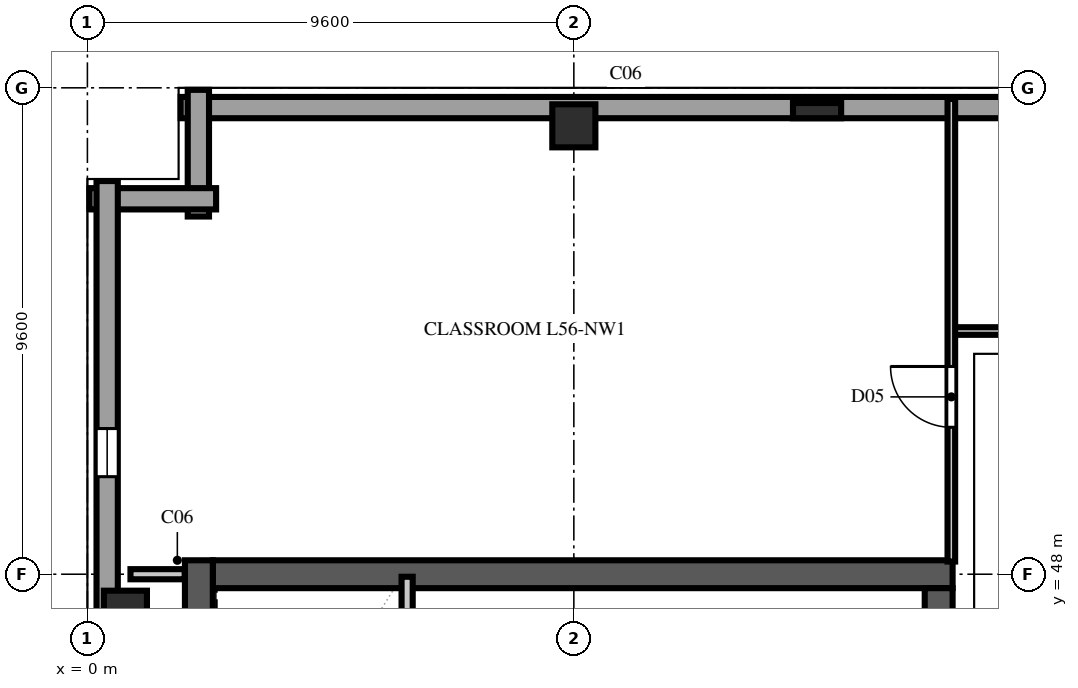
"""IFC4 building model, lengths in metres.
Left out: names, types, materials, properties, quantities, classifications, styles, units other than length and angle.
Written with IfcOpenShell. Run it as: python <this file> out.ifc"""

import sys

from ifc_helpers import new_model, si_unit, direction, frame, frame_2d, origin, origin_2d, place, context, subcontext, project, spatial, rectangle, extrude, element, fill, save


model = new_model("IFC4")
c1 = context("Model", 3, precision=1e-05, world=origin(), true_north=direction((0.0, 1.0)))
c2 = subcontext(c1, "Body", "Model", "MODEL_VIEW")
j1 = project(units=[si_unit("LENGTHUNIT", "METRE"), si_unit("PLANEANGLEUNIT", "RADIAN")], contexts=[c1])
p1 = place(None, origin())
s1 = spatial("IfcSite", under=j1, at=p1, CompositionType="ELEMENT")
p2 = place(p1, origin())
s2 = spatial("IfcBuilding", under=s1, at=p2, CompositionType="ELEMENT")
p3 = place(p2, frame((0.0, 0.0, 221.8)))
s3 = spatial("IfcBuildingStorey", under=s2, at=p3, CompositionType="ELEMENT", Elevation=221.8)
p4 = place(p3, frame((2.475, 48.0, 0.0), z_axis=(0.0, 0.0, 1.0), x_axis=(1.0, 0.0, 0.0)))
e1 = element("IfcWall", 1, at=p4, inside=s3, PredefinedType="SHEAR", context=c2, shape_type="SweptSolid", body=[
    extrude(rectangle(XDim=14.6, YDim=0.55, at=frame_2d((7.3, 0.0))), origin(), (0.0, 0.0, 1.0), 3.54),
])
p5 = place(p3, frame((2.2, 9.325, 0.0), z_axis=(0.0, 0.0, 1.0), x_axis=(0.0, 1.0, 0.0)))
e2 = element("IfcWall", 2, at=p5, inside=s3, PredefinedType="SHEAR", context=c2, shape_type="SweptSolid", body=[
    extrude(rectangle(XDim=38.95, YDim=0.55, at=frame_2d((19.475, 0.0))), origin(), (0.0, 0.0, 1.0), 3.54),
])
p6 = place(p3, frame((16.8, 36.4, 0.0), z_axis=(0.0, 0.0, 1.0), x_axis=(0.0, 1.0, 0.0)))
e3 = element("IfcWall", 3, at=p6, inside=s3, PredefinedType="SHEAR", context=c2, shape_type="SweptSolid", body=[
    extrude(rectangle(XDim=11.325, YDim=0.55, at=frame_2d((5.663, 0.0))), origin(), (0.0, 0.0, 1.0), 3.54),
])
p7 = place(p6, frame((9.2, 0.0, 0.0)))
e4 = element("IfcOpeningElement", 4, at=p7, cuts=e3, PredefinedType="OPENING", context=c2, shape_type="SweptSolid", body=[
    extrude(rectangle(XDim=0.95, YDim=2.15, at=frame_2d((0.475, 1.075))), frame((0.0, 0.287, 0.0), z_axis=(0.0, -1.0, 0.0), x_axis=(1.0, 0.0, 0.0)), (0.0, 0.0, 1.0), 0.574),
])
for number, where, z_axis, x_axis in (
    (5, (0.75, 47.25, 0.0), (0.0, 0.0, 1.0), (1.0, 0.0, 0.0)),
    (6, (9.6, 56.85, 0.0), (0.0, 0.0, 1.0), (1.0, 0.0, 0.0)),
):
    element("IfcColumn", number, at=place(p3, frame(where, z_axis=z_axis, x_axis=x_axis)), inside=s3, PredefinedType="COLUMN", context=c2, shape_type="SweptSolid", body=[
        extrude(rectangle(XDim=0.85, YDim=0.85, at=origin_2d()), origin(), (0.0, 0.0, 1.0), 3.8),
    ])
p8 = place(p3, frame((14.4, 57.15, 0.0), z_axis=(0.0, 0.0, 1.0), x_axis=(1.0, 0.0, 0.0)))
e7 = element("IfcColumn", 7, at=p8, inside=s3, PredefinedType="PILASTER", context=c2, shape_type="SweptSolid", body=[
    extrude(rectangle(XDim=0.95, YDim=0.3, at=origin_2d()), origin(), (0.0, 0.0, 1.0), 3.8),
])
p9 = place(p3, frame((36.56, 57.21, 0.0), z_axis=(0.0, 0.0, 1.0), x_axis=(-1.0, 0.0, 0.0)))
e8 = element("IfcWall", 8, at=p9, inside=s3, PredefinedType="SOLIDWALL", context=c2, shape_type="SweptSolid", body=[
    extrude(rectangle(XDim=34.72, YDim=0.42, at=frame_2d((17.36, 0.0))), origin(), (0.0, 0.0, 1.0), 3.54),
])
p10 = place(p9, frame((4.885, 0.0, 0.9)))
e9 = element("IfcOpeningElement", 9, at=p10, cuts=e8, PredefinedType="OPENING", context=c2, shape_type="SweptSolid", body=[
    extrude(rectangle(XDim=0.95, YDim=1.85, at=frame_2d((0.475, 0.925))), frame((0.0, 0.222, 0.0), z_axis=(0.0, -1.0, 0.0), x_axis=(1.0, 0.0, 0.0)), (0.0, 0.0, 1.0), 0.444),
])
p11 = place(p9, frame((9.41, 0.0, 0.9)))
e10 = element("IfcOpeningElement", 10, at=p11, cuts=e8, PredefinedType="OPENING", context=c2, shape_type="SweptSolid", body=[
    extrude(rectangle(XDim=1.5, YDim=1.85, at=frame_2d((0.75, 0.925))), frame((0.0, 0.222, 0.0), z_axis=(0.0, -1.0, 0.0), x_axis=(1.0, 0.0, 0.0)), (0.0, 0.0, 1.0), 0.444),
])
p12 = place(p9, frame((14.485, 0.0, 0.9)))
e11 = element("IfcOpeningElement", 11, at=p12, cuts=e8, PredefinedType="OPENING", context=c2, shape_type="SweptSolid", body=[
    extrude(rectangle(XDim=0.95, YDim=1.85, at=frame_2d((0.475, 0.925))), frame((0.0, 0.222, 0.0), z_axis=(0.0, -1.0, 0.0), x_axis=(1.0, 0.0, 0.0)), (0.0, 0.0, 1.0), 0.444),
])
for number, where, z_axis, x_axis in (
    (12, (2.19, 57.56, 0.0), (0.0, 0.0, 1.0), (0.0, -1.0, 0.0)),
    (13, (2.54, 55.41, 0.0), (0.0, 0.0, 1.0), (-1.0, 0.0, 0.0)),
):
    element("IfcWall", number, at=place(p3, frame(where, z_axis=z_axis, x_axis=x_axis)), inside=s3, PredefinedType="SOLIDWALL", context=c2, shape_type="SweptSolid", body=[
        extrude(rectangle(XDim=2.5, YDim=0.42, at=frame_2d((1.25, 0.0))), origin(), (0.0, 0.0, 1.0), 3.54),
    ])
p13 = place(p3, frame((0.39, 55.76, 0.0), z_axis=(0.0, 0.0, 1.0), x_axis=(0.0, -1.0, 0.0)))
e14 = element("IfcWall", 14, at=p13, inside=s3, PredefinedType="SOLIDWALL", context=c2, shape_type="SweptSolid", body=[
    extrude(rectangle(XDim=53.92, YDim=0.42, at=frame_2d((26.96, 0.0))), origin(), (0.0, 0.0, 1.0), 3.54),
])
p14 = place(p13, frame((4.885, 0.0, 0.9)))
e15 = element("IfcOpeningElement", 15, at=p14, cuts=e14, PredefinedType="OPENING", context=c2, shape_type="SweptSolid", body=[
    extrude(rectangle(XDim=0.95, YDim=1.85, at=frame_2d((0.475, 0.925))), frame((0.0, 0.222, 0.0), z_axis=(0.0, -1.0, 0.0), x_axis=(1.0, 0.0, 0.0)), (0.0, 0.0, 1.0), 0.444),
])
p15 = place(p13, frame((9.41, 0.0, 0.9)))
e16 = element("IfcOpeningElement", 16, at=p15, cuts=e14, PredefinedType="OPENING", context=c2, shape_type="SweptSolid", body=[
    extrude(rectangle(XDim=1.5, YDim=1.85, at=frame_2d((0.75, 0.925))), frame((0.0, 0.222, 0.0), z_axis=(0.0, -1.0, 0.0), x_axis=(1.0, 0.0, 0.0)), (0.0, 0.0, 1.0), 0.444),
])
p16 = place(p13, frame((14.485, 0.0, 0.9)))
e17 = element("IfcOpeningElement", 17, at=p16, cuts=e14, PredefinedType="OPENING", context=c2, shape_type="SweptSolid", body=[
    extrude(rectangle(XDim=0.95, YDim=1.85, at=frame_2d((0.475, 0.925))), frame((0.0, 0.222, 0.0), z_axis=(0.0, -1.0, 0.0), x_axis=(1.0, 0.0, 0.0)), (0.0, 0.0, 1.0), 0.444),
])
p17 = place(p13, frame((19.01, 0.0, 0.9)))
e18 = element("IfcOpeningElement", 18, at=p17, cuts=e14, PredefinedType="OPENING", context=c2, shape_type="SweptSolid", body=[
    extrude(rectangle(XDim=1.5, YDim=1.85, at=frame_2d((0.75, 0.925))), frame((0.0, 0.222, 0.0), z_axis=(0.0, -1.0, 0.0), x_axis=(1.0, 0.0, 0.0)), (0.0, 0.0, 1.0), 0.444),
])
p18 = place(p13, frame((24.085, 0.0, 0.9)))
e19 = element("IfcOpeningElement", 19, at=p18, cuts=e14, PredefinedType="OPENING", context=c2, shape_type="SweptSolid", body=[
    extrude(rectangle(XDim=0.95, YDim=1.85, at=frame_2d((0.475, 0.925))), frame((0.0, 0.222, 0.0), z_axis=(0.0, -1.0, 0.0), x_axis=(1.0, 0.0, 0.0)), (0.0, 0.0, 1.0), 0.444),
])
p19 = place(p13, frame((28.61, 0.0, 0.9)))
e20 = element("IfcOpeningElement", 20, at=p19, cuts=e14, PredefinedType="OPENING", context=c2, shape_type="SweptSolid", body=[
    extrude(rectangle(XDim=1.5, YDim=1.85, at=frame_2d((0.75, 0.925))), frame((0.0, 0.222, 0.0), z_axis=(0.0, -1.0, 0.0), x_axis=(1.0, 0.0, 0.0)), (0.0, 0.0, 1.0), 0.444),
])
p20 = place(p13, frame((33.685, 0.0, 0.9)))
e21 = element("IfcOpeningElement", 21, at=p20, cuts=e14, PredefinedType="OPENING", context=c2, shape_type="SweptSolid", body=[
    extrude(rectangle(XDim=0.95, YDim=1.85, at=frame_2d((0.475, 0.925))), frame((0.0, 0.222, 0.0), z_axis=(0.0, -1.0, 0.0), x_axis=(1.0, 0.0, 0.0)), (0.0, 0.0, 1.0), 0.444),
])
p21 = place(p13, frame((38.21, 0.0, 0.9)))
e22 = element("IfcOpeningElement", 22, at=p21, cuts=e14, PredefinedType="OPENING", context=c2, shape_type="SweptSolid", body=[
    extrude(rectangle(XDim=1.5, YDim=1.85, at=frame_2d((0.75, 0.925))), frame((0.0, 0.222, 0.0), z_axis=(0.0, -1.0, 0.0), x_axis=(1.0, 0.0, 0.0)), (0.0, 0.0, 1.0), 0.444),
])
p22 = place(p13, frame((43.285, 0.0, 0.9)))
e23 = element("IfcOpeningElement", 23, at=p22, cuts=e14, PredefinedType="OPENING", context=c2, shape_type="SweptSolid", body=[
    extrude(rectangle(XDim=0.95, YDim=1.85, at=frame_2d((0.475, 0.925))), frame((0.0, 0.222, 0.0), z_axis=(0.0, -1.0, 0.0), x_axis=(1.0, 0.0, 0.0)), (0.0, 0.0, 1.0), 0.444),
])
p23 = place(p13, frame((47.81, 0.0, 0.9)))
e24 = element("IfcOpeningElement", 24, at=p23, cuts=e14, PredefinedType="OPENING", context=c2, shape_type="SweptSolid", body=[
    extrude(rectangle(XDim=1.5, YDim=1.85, at=frame_2d((0.75, 0.925))), frame((0.0, 0.222, 0.0), z_axis=(0.0, -1.0, 0.0), x_axis=(1.0, 0.0, 0.0)), (0.0, 0.0, 1.0), 0.444),
])
p24 = place(p3, frame((6.31, 40.14, 0.0), z_axis=(0.0, 0.0, 1.0), x_axis=(0.0, 1.0, 0.0)))
e25 = element("IfcWall", 25, at=p24, inside=s3, PredefinedType="SOLIDWALL", context=c2, shape_type="SweptSolid", body=[
    extrude(rectangle(XDim=7.81, YDim=0.22, at=frame_2d((3.905, 0.0))), origin(), (0.0, 0.0, 1.0), 3.54),
])
p25 = place(p3, frame((0.85, 48.0, 0.0), z_axis=(0.0, 0.0, 1.0), x_axis=(1.0, 0.0, 0.0)))
e26 = element("IfcWall", 26, at=p25, inside=s3, PredefinedType="SOLIDWALL", context=c2, shape_type="SweptSolid", body=[
    extrude(rectangle(XDim=1.07, YDim=0.2, at=frame_2d((0.535, 0.0))), origin(), (0.0, 0.0, 1.0), 3.54),
])
p26 = place(p3, frame((17.05, 52.8, 0.0), z_axis=(0.0, 0.0, 1.0), x_axis=(1.0, 0.0, 0.0)))
e27 = element("IfcWall", 27, at=p26, inside=s3, PredefinedType="PARTITIONING", context=c2, shape_type="SweptSolid", body=[
    extrude(rectangle(XDim=2.15, YDim=0.15, at=frame_2d((1.075, 0.0))), origin(), (0.0, 0.0, 1.0), 3.54),
])
p27 = place(p3, frame((17.05, 48.25, 0.0), z_axis=(0.0, 0.0, 1.0), x_axis=(0.0, 1.0, 0.0)))
e28 = element("IfcWall", 28, at=p27, inside=s3, PredefinedType="PARTITIONING", context=c2, shape_type="SweptSolid", body=[
    extrude(rectangle(XDim=9.13, YDim=0.15, at=frame_2d((4.565, 0.0))), origin(), (0.0, 0.0, 1.0), 3.54),
])
p28 = place(p27, frame((2.65, 0.0, 0.0)))
e29 = element("IfcOpeningElement", 29, at=p28, cuts=e28, PredefinedType="OPENING", context=c2, shape_type="SweptSolid", body=[
    extrude(rectangle(XDim=1.2, YDim=2.2, at=frame_2d((0.6, 1.1))), frame((0.0, 0.087, 0.0), z_axis=(0.0, -1.0, 0.0), x_axis=(1.0, 0.0, 0.0)), (0.0, 0.0, 1.0), 0.174),
])
p29 = place(p14, origin())
e30 = element("IfcWindow", 30, at=p29, inside=s3, PartitioningType="SINGLE_PANEL", PredefinedType="WINDOW", context=c2, shape_type="SweptSolid", body=[
    extrude(rectangle(XDim=0.95, YDim=1.85, at=frame_2d((0.475, 0.925))), frame((0.0, 0.11, 0.0), z_axis=(0.0, -1.0, 0.0), x_axis=(1.0, 0.0, 0.0)), (0.0, 0.0, 1.0), 0.06),
])
fill(e15, e30)
p30 = place(p28, origin())
e31 = element("IfcDoor", 31, at=p30, inside=s3, OperationType="SINGLE_SWING_RIGHT", PredefinedType="DOOR", context=c2, shape_type="SweptSolid", body=[
    extrude(rectangle(XDim=1.2, YDim=2.2, at=frame_2d((0.6, 1.1))), frame((0.0, 0.025, 0.0), z_axis=(0.0, -1.0, 0.0), x_axis=(1.0, 0.0, 0.0)), (0.0, 0.0, 1.0), 0.05),
])
fill(e29, e31)
save(model, sys.argv[1])
